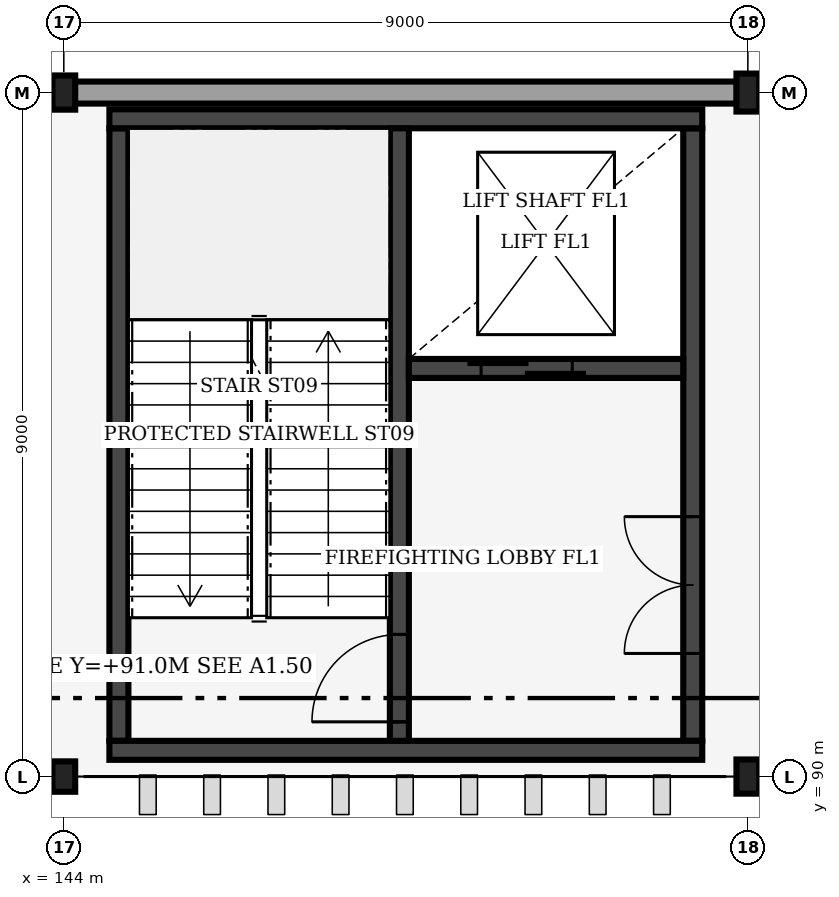
"""IFC4 building model, lengths in metres.
Left out: names, types, materials, properties, quantities, classifications, styles, units other than length and angle.
Written with IfcOpenShell. Run it as: python <this file> out.ifc"""

import sys

from ifc_helpers import new_model, si_unit, direction, frame, frame_2d, origin, origin_2d, place, context, subcontext, project, spatial, rectangle, i_section, extrude, element, fill, save


model = new_model("IFC4")
c1 = context("Model", 3, precision=1e-05, world=origin(), true_north=direction((0.0, 1.0)))
c2 = subcontext(c1, "Body", "Model", "MODEL_VIEW")
j1 = project(units=[si_unit("LENGTHUNIT", "METRE"), si_unit("PLANEANGLEUNIT", "RADIAN")], contexts=[c1])
p1 = place(None, origin())
s1 = spatial("IfcSite", under=j1, at=p1, CompositionType="ELEMENT")
p2 = place(p1, origin())
s2 = spatial("IfcBuilding", under=s1, at=p2, CompositionType="ELEMENT")
p3 = place(p2, frame((0.0, 0.0, 18.0)))
s3 = spatial("IfcBuildingStorey", under=s2, at=p3, CompositionType="ELEMENT", Elevation=18.0)
p4 = place(p3, frame((144.0, 90.0, 0.0), z_axis=(0.0, 0.0, 1.0), x_axis=(1.0, 0.0, 0.0)))
e1 = element("IfcColumn", 1, at=p4, inside=s3, PredefinedType="COLUMN", context=c2, shape_type="SweptSolid", body=[
    extrude(i_section(OverallWidth=0.3, OverallDepth=0.4, WebThickness=0.013, FlangeThickness=0.024, FilletRadius=0.027, at=origin_2d()), origin(), (0.0, 0.0, 1.0), 4.8),
])
for number, where, z_axis, x_axis in (
    (2, (144.0, 99.0, 0.0), (0.0, 0.0, 1.0), (1.0, 0.0, 0.0)),
    (3, (153.0, 90.0, 0.0), (0.0, 0.0, 1.0), (1.0, 0.0, 0.0)),
):
    element("IfcColumn", number, at=place(p3, frame(where, z_axis=z_axis, x_axis=x_axis)), inside=s3, PredefinedType="COLUMN", context=c2, shape_type="SweptSolid", body=[
        extrude(i_section(OverallWidth=0.3, OverallDepth=0.45, WebThickness=0.014, FlangeThickness=0.026, FilletRadius=0.027, at=origin_2d()), origin(), (0.0, 0.0, 1.0), 4.8),
    ])
p5 = place(p3, frame((153.0, 99.0, 0.0), z_axis=(0.0, 0.0, 1.0), x_axis=(1.0, 0.0, 0.0)))
e4 = element("IfcColumn", 4, at=p5, inside=s3, PredefinedType="COLUMN", context=c2, shape_type="SweptSolid", body=[
    extrude(i_section(OverallWidth=0.3, OverallDepth=0.5, WebThickness=0.014, FlangeThickness=0.028, FilletRadius=0.027, at=origin_2d()), origin(), (0.0, 0.0, 1.0), 4.8),
])
p6 = place(p3, frame((144.145, 99.0, 0.0), z_axis=(0.0, 0.0, 1.0), x_axis=(1.0, 0.0, 0.0)))
e5 = element("IfcWall", 5, at=p6, inside=s3, PredefinedType="SOLIDWALL", context=c2, shape_type="SweptSolid", body=[
    extrude(rectangle(XDim=8.71, YDim=0.29, at=frame_2d((4.355, 0.0))), origin(), (0.0, 0.0, 1.0), 3.65),
])
p7 = place(p3, frame((144.725, 90.47, 0.0), z_axis=(0.0, 0.0, 1.0), x_axis=(0.0, 1.0, 0.0)))
e6 = element("IfcWall", 6, at=p7, inside=s3, PredefinedType="SHEAR", context=c2, shape_type="SweptSolid", body=[
    extrude(rectangle(XDim=8.06, YDim=0.25, at=frame_2d((4.03, 0.0))), origin(), (0.0, 0.0, 1.0), 4.44),
])
p8 = place(p3, frame((152.275, 90.47, 0.0), z_axis=(0.0, 0.0, 1.0), x_axis=(0.0, 1.0, 0.0)))
e7 = element("IfcWall", 7, at=p8, inside=s3, PredefinedType="SHEAR", context=c2, shape_type="SweptSolid", body=[
    extrude(rectangle(XDim=8.06, YDim=0.25, at=frame_2d((4.03, 0.0))), origin(), (0.0, 0.0, 1.0), 4.44),
])
p9 = place(p8, frame((1.15, 0.0, 0.0)))
e8 = element("IfcOpeningElement", 8, at=p9, cuts=e7, PredefinedType="OPENING", context=c2, shape_type="SweptSolid", body=[
    extrude(rectangle(XDim=1.8, YDim=2.2, at=frame_2d((0.9, 1.1))), frame((0.0, 0.135, 0.0), z_axis=(0.0, -1.0, 0.0), x_axis=(1.0, 0.0, 0.0)), (0.0, 0.0, 1.0), 0.27),
])
for number, where, z_axis, x_axis in (
    (9, (144.6, 90.345, 0.0), (0.0, 0.0, 1.0), (1.0, 0.0, 0.0)),
    (10, (144.6, 98.655, 0.0), (0.0, 0.0, 1.0), (1.0, 0.0, 0.0)),
):
    element("IfcWall", number, at=place(p3, frame(where, z_axis=z_axis, x_axis=x_axis)), inside=s3, PredefinedType="SHEAR", context=c2, shape_type="SweptSolid", body=[
        extrude(rectangle(XDim=7.8, YDim=0.25, at=frame_2d((3.9, 0.0))), origin(), (0.0, 0.0, 1.0), 4.44),
    ])
p10 = place(p3, frame((148.415, 90.47, 0.0), z_axis=(0.0, 0.0, 1.0), x_axis=(0.0, 1.0, 0.0)))
e11 = element("IfcWall", 11, at=p10, inside=s3, PredefinedType="SHEAR", context=c2, shape_type="SweptSolid", body=[
    extrude(rectangle(XDim=8.06, YDim=0.25, at=frame_2d((4.03, 0.0))), origin(), (0.0, 0.0, 1.0), 4.44),
])
p11 = place(p10, frame((0.25, 0.0, 0.0)))
e12 = element("IfcOpeningElement", 12, at=p11, cuts=e11, PredefinedType="OPENING", context=c2, shape_type="SweptSolid", body=[
    extrude(rectangle(XDim=1.15, YDim=2.15, at=frame_2d((0.575, 1.075))), frame((0.0, 0.135, 0.0), z_axis=(0.0, -1.0, 0.0), x_axis=(1.0, 0.0, 0.0)), (0.0, 0.0, 1.0), 0.27),
])
p12 = place(p3, frame((148.54, 95.37, 0.0), z_axis=(0.0, 0.0, 1.0), x_axis=(1.0, 0.0, 0.0)))
e13 = element("IfcWall", 13, at=p12, inside=s3, PredefinedType="SHEAR", context=c2, shape_type="SweptSolid", body=[
    extrude(rectangle(XDim=3.61, YDim=0.25, at=frame_2d((1.805, 0.0))), origin(), (0.0, 0.0, 1.0), 4.44),
])
p13 = place(p12, frame((0.95, 0.0, 0.0)))
e14 = element("IfcOpeningElement", 14, at=p13, cuts=e13, PredefinedType="OPENING", context=c2, shape_type="SweptSolid", body=[
    extrude(rectangle(XDim=1.2, YDim=2.2, at=frame_2d((0.6, 1.1))), frame((0.0, 0.135, 0.0), z_axis=(0.0, -1.0, 0.0), x_axis=(1.0, 0.0, 0.0)), (0.0, 0.0, 1.0), 0.27),
])
p14 = place(p11, origin())
e15 = element("IfcDoor", 15, at=p14, inside=s3, OperationType="SINGLE_SWING_LEFT", PredefinedType="DOOR", context=c2, shape_type="SweptSolid", body=[
    extrude(rectangle(XDim=1.15, YDim=2.15, at=frame_2d((0.575, 1.075))), frame((0.0, 0.025, 0.0), z_axis=(0.0, -1.0, 0.0), x_axis=(1.0, 0.0, 0.0)), (0.0, 0.0, 1.0), 0.05),
])
fill(e12, e15)
p15 = place(p13, origin())
e16 = element("IfcDoor", 16, at=p15, inside=s3, OperationType="DOUBLE_DOOR_SLIDING", PredefinedType="DOOR", context=c2, shape_type="SweptSolid", body=[
    extrude(rectangle(XDim=1.2, YDim=2.2, at=frame_2d((0.6, 1.1))), frame((0.0, 0.025, 0.0), z_axis=(0.0, -1.0, 0.0), x_axis=(1.0, 0.0, 0.0)), (0.0, 0.0, 1.0), 0.05),
])
fill(e14, e16)
p16 = place(p9, origin())
e17 = element("IfcDoor", 17, at=p16, inside=s3, OperationType="DOUBLE_DOOR_SINGLE_SWING", PredefinedType="DOOR", context=c2, shape_type="SweptSolid", body=[
    extrude(rectangle(XDim=1.8, YDim=2.2, at=frame_2d((0.9, 1.1))), frame((0.0, 0.025, 0.0), z_axis=(0.0, -1.0, 0.0), x_axis=(1.0, 0.0, 0.0)), (0.0, 0.0, 1.0), 0.05),
])
fill(e8, e17)
save(model, sys.argv[1])
